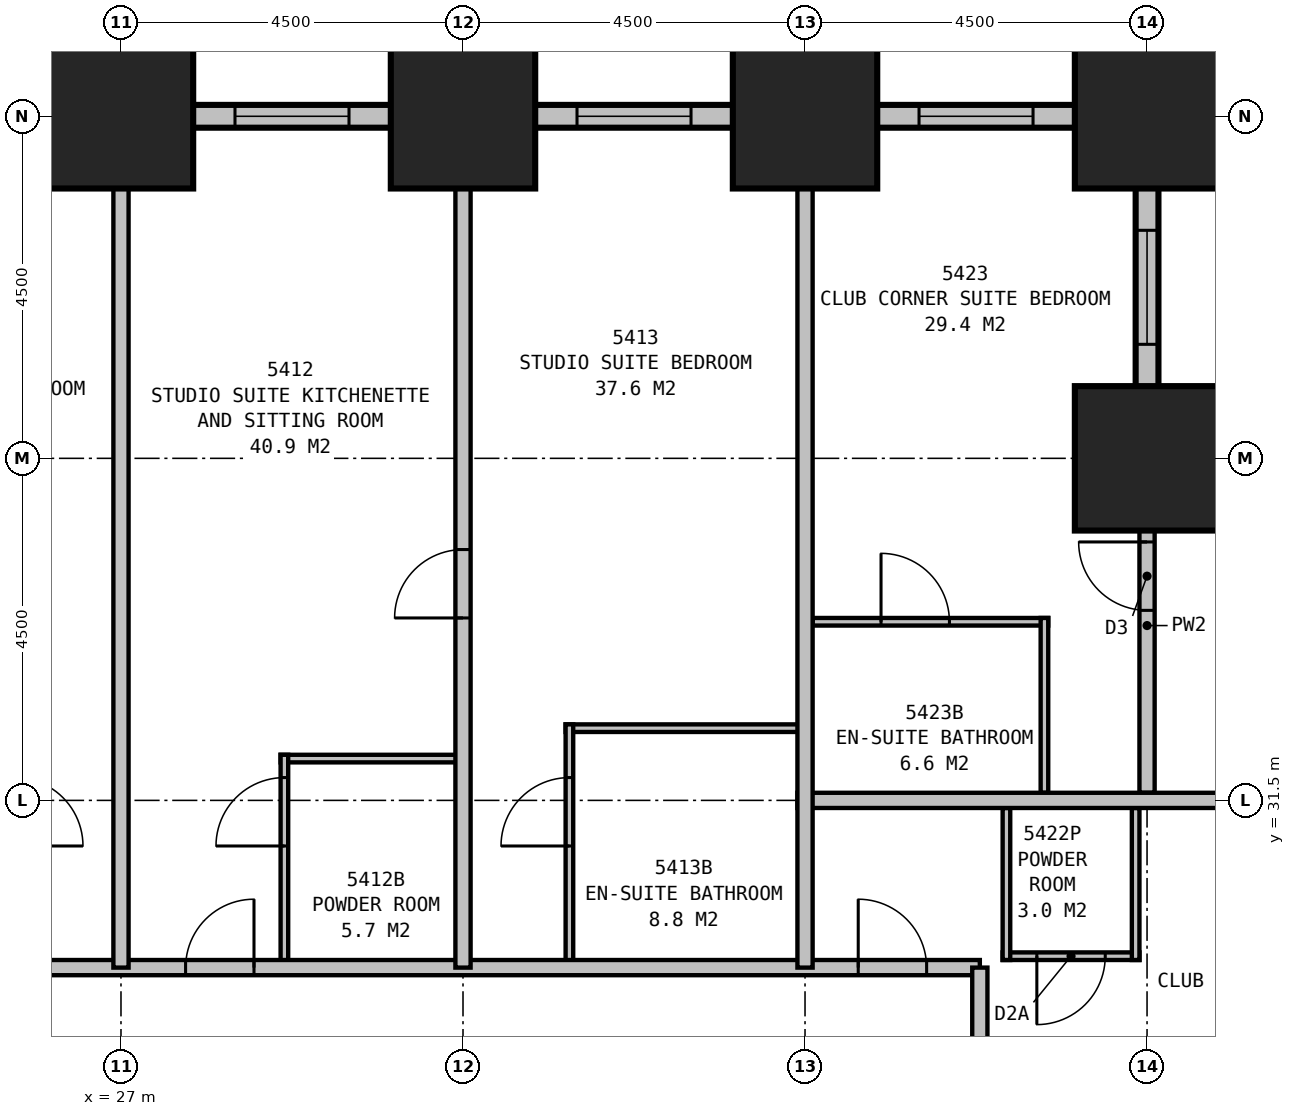
"""IFC4 building model, lengths in metres.
Left out: names, types, materials, properties, quantities, classifications, styles, units other than length and angle.
Written with IfcOpenShell. Run it as: python <this file> out.ifc"""

import sys

from ifc_helpers import new_model, si_unit, direction, frame, frame_2d, origin, origin_2d, place, context, subcontext, project, spatial, rectangle, extrude, element, fill, save


model = new_model("IFC4")
c1 = context("Model", 3, precision=1e-05, world=origin(), true_north=direction((0.0, 1.0)))
c2 = subcontext(c1, "Body", "Model", "MODEL_VIEW")
j1 = project(units=[si_unit("LENGTHUNIT", "METRE"), si_unit("PLANEANGLEUNIT", "RADIAN")], contexts=[c1])
p1 = place(None, origin())
s1 = spatial("IfcSite", under=j1, at=p1, CompositionType="ELEMENT")
p2 = place(p1, origin())
s2 = spatial("IfcBuilding", under=s1, at=p2, CompositionType="ELEMENT")
p3 = place(p2, frame((0.0, 0.0, 207.9)))
s3 = spatial("IfcBuildingStorey", under=s2, at=p3, CompositionType="ELEMENT", Elevation=207.9)
for number, where, z_axis, x_axis in (
    (1, (40.5, 36.0, 0.0), (0.0, 0.0, 1.0), (1.0, 0.0, 0.0)),
    (2, (40.5, 40.5, 0.0), (0.0, 0.0, 1.0), (1.0, 0.0, 0.0)),
    (3, (36.0, 40.5, 0.0), (0.0, 0.0, 1.0), (1.0, 0.0, 0.0)),
    (4, (31.5, 40.5, 0.0), (0.0, 0.0, 1.0), (1.0, 0.0, 0.0)),
    (5, (27.0, 40.5, 0.0), (0.0, 0.0, 1.0), (1.0, 0.0, 0.0)),
):
    element("IfcColumn", number, at=place(p3, frame(where, z_axis=z_axis, x_axis=x_axis)), inside=s3, PredefinedType="COLUMN", context=c2, shape_type="SweptSolid", body=[
        extrude(rectangle(XDim=1.9, YDim=1.9, at=origin_2d()), origin(), (0.0, 0.0, 1.0), 3.5),
    ])
p4 = place(p3, frame((45.65, 36.0, 0.0), z_axis=(0.0, 0.0, 1.0), x_axis=(-1.0, 0.0, 0.0)))
e6 = element("IfcWall", 6, at=p4, inside=s3, PredefinedType="STANDARD", context=c2, shape_type="SweptSolid", body=[
    extrude(rectangle(XDim=5.3, YDim=0.3, at=frame_2d((2.65, 0.0))), origin(), (0.0, 0.0, 1.0), 1.9),
])
p5 = place(p4, frame((1.45, 0.0, 0.5)))
e7 = element("IfcOpeningElement", 7, at=p5, cuts=e6, PredefinedType="OPENING", context=c2, shape_type="SweptSolid", body=[
    extrude(rectangle(XDim=2.4, YDim=1.2, at=frame_2d((1.2, 0.6))), frame((0.0, 0.16, 0.0), z_axis=(0.0, -1.0, 0.0), x_axis=(1.0, 0.0, 0.0)), (0.0, 0.0, 1.0), 0.32),
])
p6 = place(p3, frame((40.5, 35.85, 0.0), z_axis=(0.0, 0.0, 1.0), x_axis=(0.0, 1.0, 0.0)))
e8 = element("IfcWall", 8, at=p6, inside=s3, PredefinedType="STANDARD", context=c2, shape_type="SweptSolid", body=[
    extrude(rectangle(XDim=4.8, YDim=0.3, at=frame_2d((2.4, 0.0))), origin(), (0.0, 0.0, 1.0), 1.9),
])
p7 = place(p6, frame((1.65, 0.0, 0.5)))
e9 = element("IfcOpeningElement", 9, at=p7, cuts=e8, PredefinedType="OPENING", context=c2, shape_type="SweptSolid", body=[
    extrude(rectangle(XDim=1.5, YDim=1.2, at=frame_2d((0.75, 0.6))), frame((0.0, 0.16, 0.0), z_axis=(0.0, -1.0, 0.0), x_axis=(1.0, 0.0, 0.0)), (0.0, 0.0, 1.0), 0.32),
])
p8 = place(p3, frame((40.65, 40.5, 0.0), z_axis=(0.0, 0.0, 1.0), x_axis=(-1.0, 0.0, 0.0)))
e10 = element("IfcWall", 10, at=p8, inside=s3, PredefinedType="STANDARD", context=c2, shape_type="SweptSolid", body=[
    extrude(rectangle(XDim=31.8, YDim=0.3, at=frame_2d((15.9, 0.0))), origin(), (0.0, 0.0, 1.0), 1.9),
])
p9 = place(p8, frame((1.65, 0.0, 0.5)))
e11 = element("IfcOpeningElement", 11, at=p9, cuts=e10, PredefinedType="OPENING", context=c2, shape_type="SweptSolid", body=[
    extrude(rectangle(XDim=1.5, YDim=1.2, at=frame_2d((0.75, 0.6))), frame((0.0, 0.16, 0.0), z_axis=(0.0, -1.0, 0.0), x_axis=(1.0, 0.0, 0.0)), (0.0, 0.0, 1.0), 0.32),
])
p10 = place(p8, frame((6.15, 0.0, 0.5)))
e12 = element("IfcOpeningElement", 12, at=p10, cuts=e10, PredefinedType="OPENING", context=c2, shape_type="SweptSolid", body=[
    extrude(rectangle(XDim=1.5, YDim=1.2, at=frame_2d((0.75, 0.6))), frame((0.0, 0.16, 0.0), z_axis=(0.0, -1.0, 0.0), x_axis=(1.0, 0.0, 0.0)), (0.0, 0.0, 1.0), 0.32),
])
p11 = place(p8, frame((10.65, 0.0, 0.5)))
e13 = element("IfcOpeningElement", 13, at=p11, cuts=e10, PredefinedType="OPENING", context=c2, shape_type="SweptSolid", body=[
    extrude(rectangle(XDim=1.5, YDim=1.2, at=frame_2d((0.75, 0.6))), frame((0.0, 0.16, 0.0), z_axis=(0.0, -1.0, 0.0), x_axis=(1.0, 0.0, 0.0)), (0.0, 0.0, 1.0), 0.32),
])
p12 = place(p8, frame((15.15, 0.0, 0.5)))
e14 = element("IfcOpeningElement", 14, at=p12, cuts=e10, PredefinedType="OPENING", context=c2, shape_type="SweptSolid", body=[
    extrude(rectangle(XDim=1.5, YDim=1.2, at=frame_2d((0.75, 0.6))), frame((0.0, 0.16, 0.0), z_axis=(0.0, -1.0, 0.0), x_axis=(1.0, 0.0, 0.0)), (0.0, 0.0, 1.0), 0.32),
])
p13 = place(p8, frame((19.65, 0.0, 0.5)))
e15 = element("IfcOpeningElement", 15, at=p13, cuts=e10, PredefinedType="OPENING", context=c2, shape_type="SweptSolid", body=[
    extrude(rectangle(XDim=1.5, YDim=1.2, at=frame_2d((0.75, 0.6))), frame((0.0, 0.16, 0.0), z_axis=(0.0, -1.0, 0.0), x_axis=(1.0, 0.0, 0.0)), (0.0, 0.0, 1.0), 0.32),
])
p14 = place(p8, frame((24.15, 0.0, 0.5)))
e16 = element("IfcOpeningElement", 16, at=p14, cuts=e10, PredefinedType="OPENING", context=c2, shape_type="SweptSolid", body=[
    extrude(rectangle(XDim=1.5, YDim=1.2, at=frame_2d((0.75, 0.6))), frame((0.0, 0.16, 0.0), z_axis=(0.0, -1.0, 0.0), x_axis=(1.0, 0.0, 0.0)), (0.0, 0.0, 1.0), 0.32),
])
p15 = place(p8, frame((28.65, 0.0, 0.5)))
e17 = element("IfcOpeningElement", 17, at=p15, cuts=e10, PredefinedType="OPENING", context=c2, shape_type="SweptSolid", body=[
    extrude(rectangle(XDim=1.5, YDim=1.2, at=frame_2d((0.75, 0.6))), frame((0.0, 0.16, 0.0), z_axis=(0.0, -1.0, 0.0), x_axis=(1.0, 0.0, 0.0)), (0.0, 0.0, 1.0), 0.32),
])
p16 = place(p3, frame((11.2, 29.3, 0.0), z_axis=(0.0, 0.0, 1.0), x_axis=(1.0, 0.0, 0.0)))
e18 = element("IfcWall", 18, at=p16, inside=s3, PredefinedType="PARTITIONING", context=c2, shape_type="SweptSolid", body=[
    extrude(rectangle(XDim=27.1, YDim=0.2, at=frame_2d((13.55, 0.0))), origin(), (0.0, 0.0, 1.0), 3.25),
])
p17 = place(p16, frame((3.15, 0.0, 0.0)))
e19 = element("IfcOpeningElement", 19, at=p17, cuts=e18, PredefinedType="OPENING", context=c2, shape_type="SweptSolid", body=[
    extrude(rectangle(XDim=0.9, YDim=2.1, at=frame_2d((0.45, 1.05))), frame((0.0, 0.11, 0.0), z_axis=(0.0, -1.0, 0.0), x_axis=(1.0, 0.0, 0.0)), (0.0, 0.0, 1.0), 0.22),
])
p18 = place(p16, frame((16.65, 0.0, 0.0)))
e20 = element("IfcOpeningElement", 20, at=p18, cuts=e18, PredefinedType="OPENING", context=c2, shape_type="SweptSolid", body=[
    extrude(rectangle(XDim=0.9, YDim=2.1, at=frame_2d((0.45, 1.05))), frame((0.0, 0.11, 0.0), z_axis=(0.0, -1.0, 0.0), x_axis=(1.0, 0.0, 0.0)), (0.0, 0.0, 1.0), 0.22),
])
p19 = place(p16, frame((25.5, 0.0, 0.0)))
e21 = element("IfcOpeningElement", 21, at=p19, cuts=e18, PredefinedType="OPENING", context=c2, shape_type="SweptSolid", body=[
    extrude(rectangle(XDim=0.9, YDim=2.1, at=frame_2d((0.45, 1.05))), frame((0.0, 0.11, 0.0), z_axis=(0.0, -1.0, 0.0), x_axis=(1.0, 0.0, 0.0)), (0.0, 0.0, 1.0), 0.22),
])
p20 = place(p16, frame((0.7, 0.0, 0.0)))
e22 = element("IfcOpeningElement", 22, at=p20, cuts=e18, PredefinedType="OPENING", context=c2, shape_type="SweptSolid", body=[
    extrude(rectangle(XDim=0.9, YDim=2.1, at=frame_2d((0.45, 1.05))), frame((0.0, 0.11, 0.0), z_axis=(0.0, -1.0, 0.0), x_axis=(1.0, 0.0, 0.0)), (0.0, 0.0, 1.0), 0.22),
])
p21 = place(p3, frame((38.3, 10.6, 0.0), z_axis=(0.0, 0.0, 1.0), x_axis=(0.0, 1.0, 0.0)))
e23 = element("IfcWall", 23, at=p21, inside=s3, PredefinedType="PARTITIONING", context=c2, shape_type="SweptSolid", body=[
    extrude(rectangle(XDim=18.7, YDim=0.2, at=frame_2d((9.35, 0.0))), origin(), (0.0, 0.0, 1.0), 3.25),
])
p22 = place(p21, frame((6.95, 0.0, 0.0), z_axis=(0.0, 0.0, 1.0), x_axis=(-1.0, 0.0, 0.0)))
e24 = element("IfcOpeningElement", 24, at=p22, cuts=e23, PredefinedType="OPENING", context=c2, shape_type="SweptSolid", body=[
    extrude(rectangle(XDim=0.9, YDim=2.1, at=frame_2d((0.45, 1.05))), frame((0.0, 0.11, 0.0), z_axis=(0.0, -1.0, 0.0), x_axis=(1.0, 0.0, 0.0)), (0.0, 0.0, 1.0), 0.22),
])
p23 = place(p21, frame((10.9, 0.0, 0.0), z_axis=(0.0, 0.0, 1.0), x_axis=(-1.0, 0.0, 0.0)))
e25 = element("IfcOpeningElement", 25, at=p23, cuts=e23, PredefinedType="OPENING", context=c2, shape_type="SweptSolid", body=[
    extrude(rectangle(XDim=0.9, YDim=2.1, at=frame_2d((0.45, 1.05))), frame((0.0, 0.11, 0.0), z_axis=(0.0, -1.0, 0.0), x_axis=(1.0, 0.0, 0.0)), (0.0, 0.0, 1.0), 0.22),
])
p24 = place(p3, frame((27.0, 29.3, 0.0), z_axis=(0.0, 0.0, 1.0), x_axis=(0.0, 1.0, 0.0)))
e26 = element("IfcWall", 26, at=p24, inside=s3, PredefinedType="PARTITIONING", context=c2, shape_type="SweptSolid", body=[
    extrude(rectangle(XDim=11.2, YDim=0.2, at=frame_2d((5.6, 0.0))), origin(), (0.0, 0.0, 1.0), 2.2),
])
p25 = place(p3, frame((31.5, 29.3, 0.0), z_axis=(0.0, 0.0, 1.0), x_axis=(0.0, 1.0, 0.0)))
e27 = element("IfcWall", 27, at=p25, inside=s3, PredefinedType="PARTITIONING", context=c2, shape_type="SweptSolid", body=[
    extrude(rectangle(XDim=11.2, YDim=0.2, at=frame_2d((5.6, 0.0))), origin(), (0.0, 0.0, 1.0), 2.2),
])
p26 = place(p25, frame((4.6, 0.0, 0.0)))
e28 = element("IfcOpeningElement", 28, at=p26, cuts=e27, PredefinedType="OPENING", context=c2, shape_type="SweptSolid", body=[
    extrude(rectangle(XDim=0.9, YDim=2.1, at=frame_2d((0.45, 1.05))), frame((0.0, 0.11, 0.0), z_axis=(0.0, -1.0, 0.0), x_axis=(1.0, 0.0, 0.0)), (0.0, 0.0, 1.0), 0.22),
])
p27 = place(p3, frame((29.1, 32.05, 0.0), z_axis=(0.0, 0.0, 1.0), x_axis=(1.0, 0.0, 0.0)))
e29 = element("IfcWall", 29, at=p27, inside=s3, PredefinedType="PLUMBINGWALL", context=c2, shape_type="SweptSolid", body=[
    extrude(rectangle(XDim=2.4, YDim=0.1, at=frame_2d((1.2, 0.0))), origin(), (0.0, 0.0, 1.0), 3.25),
])
p28 = place(p3, frame((29.15, 29.3, 0.0), z_axis=(0.0, 0.0, 1.0), x_axis=(0.0, 1.0, 0.0)))
e30 = element("IfcWall", 30, at=p28, inside=s3, PredefinedType="PLUMBINGWALL", context=c2, shape_type="SweptSolid", body=[
    extrude(rectangle(XDim=2.8, YDim=0.1, at=frame_2d((1.4, 0.0))), origin(), (0.0, 0.0, 1.0), 3.25),
])
p29 = place(p28, frame((1.6, 0.0, 0.0)))
e31 = element("IfcOpeningElement", 31, at=p29, cuts=e30, PredefinedType="OPENING", context=c2, shape_type="SweptSolid", body=[
    extrude(rectangle(XDim=0.9, YDim=2.1, at=frame_2d((0.45, 1.05))), frame((0.0, 0.06, 0.0), z_axis=(0.0, -1.0, 0.0), x_axis=(1.0, 0.0, 0.0)), (0.0, 0.0, 1.0), 0.12),
])
p30 = place(p3, frame((32.85, 32.45, 0.0), z_axis=(0.0, 0.0, 1.0), x_axis=(1.0, 0.0, 0.0)))
e32 = element("IfcWall", 32, at=p30, inside=s3, PredefinedType="PLUMBINGWALL", context=c2, shape_type="SweptSolid", body=[
    extrude(rectangle(XDim=3.15, YDim=0.1, at=frame_2d((1.575, 0.0))), origin(), (0.0, 0.0, 1.0), 3.25),
])
p31 = place(p3, frame((32.9, 29.3, 0.0), z_axis=(0.0, 0.0, 1.0), x_axis=(0.0, 1.0, 0.0)))
e33 = element("IfcWall", 33, at=p31, inside=s3, PredefinedType="PLUMBINGWALL", context=c2, shape_type="SweptSolid", body=[
    extrude(rectangle(XDim=3.2, YDim=0.1, at=frame_2d((1.6, 0.0))), origin(), (0.0, 0.0, 1.0), 3.25),
])
p32 = place(p31, frame((1.6, 0.0, 0.0)))
e34 = element("IfcOpeningElement", 34, at=p32, cuts=e33, PredefinedType="OPENING", context=c2, shape_type="SweptSolid", body=[
    extrude(rectangle(XDim=0.9, YDim=2.1, at=frame_2d((0.45, 1.05))), frame((0.0, 0.06, 0.0), z_axis=(0.0, -1.0, 0.0), x_axis=(1.0, 0.0, 0.0)), (0.0, 0.0, 1.0), 0.12),
])
p33 = place(p3, frame((36.0, 29.3, 0.0), z_axis=(0.0, 0.0, 1.0), x_axis=(0.0, 1.0, 0.0)))
e35 = element("IfcWall", 35, at=p33, inside=s3, PredefinedType="PARTITIONING", context=c2, shape_type="SweptSolid", body=[
    extrude(rectangle(XDim=11.2, YDim=0.2, at=frame_2d((5.6, 0.0))), origin(), (0.0, 0.0, 1.0), 2.2),
])
p34 = place(p3, frame((35.9, 31.5, 0.0), z_axis=(0.0, 0.0, 1.0), x_axis=(1.0, 0.0, 0.0)))
e36 = element("IfcWall", 36, at=p34, inside=s3, PredefinedType="PARTITIONING", context=c2, shape_type="SweptSolid", body=[
    extrude(rectangle(XDim=10.099, YDim=0.2, at=frame_2d((5.05, 0.0))), origin(), (0.0, 0.0, 1.0), 3.25),
])
p35 = place(p34, frame((8.099, 0.0, 0.0)))
e37 = element("IfcOpeningElement", 37, at=p35, cuts=e36, PredefinedType="OPENING", context=c2, shape_type="SweptSolid", body=[
    extrude(rectangle(XDim=0.9, YDim=2.1, at=frame_2d((0.45, 1.05))), frame((0.0, 0.11, 0.0), z_axis=(0.0, -1.0, 0.0), x_axis=(1.0, 0.0, 0.0)), (0.0, 0.0, 1.0), 0.22),
])
p36 = place(p3, frame((40.35, 31.4, 0.0), z_axis=(0.0, 0.0, 1.0), x_axis=(0.0, -1.0, 0.0)))
e38 = element("IfcWall", 38, at=p36, inside=s3, PredefinedType="PLUMBINGWALL", context=c2, shape_type="SweptSolid", body=[
    extrude(rectangle(XDim=2.0, YDim=0.1, at=frame_2d((1.0, 0.0))), origin(), (0.0, 0.0, 1.0), 2.2),
])
p37 = place(p3, frame((38.65, 31.4, 0.0), z_axis=(0.0, 0.0, 1.0), x_axis=(0.0, -1.0, 0.0)))
e39 = element("IfcWall", 39, at=p37, inside=s3, PredefinedType="PLUMBINGWALL", context=c2, shape_type="SweptSolid", body=[
    extrude(rectangle(XDim=2.0, YDim=0.1, at=frame_2d((1.0, 0.0))), origin(), (0.0, 0.0, 1.0), 3.25),
])
p38 = place(p3, frame((38.6, 29.45, 0.0), z_axis=(0.0, 0.0, 1.0), x_axis=(1.0, 0.0, 0.0)))
e40 = element("IfcWall", 40, at=p38, inside=s3, PredefinedType="PLUMBINGWALL", context=c2, shape_type="SweptSolid", body=[
    extrude(rectangle(XDim=1.8, YDim=0.1, at=frame_2d((0.9, 0.0))), origin(), (0.0, 0.0, 1.0), 3.25),
])
p39 = place(p38, frame((1.35, 0.0, 0.0), z_axis=(0.0, 0.0, 1.0), x_axis=(-1.0, 0.0, 0.0)))
e41 = element("IfcOpeningElement", 41, at=p39, cuts=e40, PredefinedType="OPENING", context=c2, shape_type="SweptSolid", body=[
    extrude(rectangle(XDim=0.9, YDim=2.1, at=frame_2d((0.45, 1.05))), frame((0.0, 0.06, 0.0), z_axis=(0.0, -1.0, 0.0), x_axis=(1.0, 0.0, 0.0)), (0.0, 0.0, 1.0), 0.12),
])
p40 = place(p3, frame((40.5, 31.6, 0.0), z_axis=(0.0, 0.0, 1.0), x_axis=(0.0, 1.0, 0.0)))
e42 = element("IfcWall", 42, at=p40, inside=s3, PredefinedType="PARTITIONING", context=c2, shape_type="SweptSolid", body=[
    extrude(rectangle(XDim=4.4, YDim=0.2, at=frame_2d((2.2, 0.0))), origin(), (0.0, 0.0, 1.0), 2.2),
])
p41 = place(p40, frame((2.4, 0.0, 0.0)))
e43 = element("IfcOpeningElement", 43, at=p41, cuts=e42, PredefinedType="OPENING", context=c2, shape_type="SweptSolid", body=[
    extrude(rectangle(XDim=0.9, YDim=2.1, at=frame_2d((0.45, 1.05))), frame((0.0, 0.11, 0.0), z_axis=(0.0, -1.0, 0.0), x_axis=(1.0, 0.0, 0.0)), (0.0, 0.0, 1.0), 0.22),
])
p42 = place(p3, frame((39.15, 31.6, 0.0), z_axis=(0.0, 0.0, 1.0), x_axis=(0.0, 1.0, 0.0)))
e44 = element("IfcWall", 44, at=p42, inside=s3, PredefinedType="PLUMBINGWALL", context=c2, shape_type="SweptSolid", body=[
    extrude(rectangle(XDim=2.3, YDim=0.1, at=frame_2d((1.15, 0.0))), origin(), (0.0, 0.0, 1.0), 3.25),
])
p43 = place(p3, frame((36.1, 33.85, 0.0), z_axis=(0.0, 0.0, 1.0), x_axis=(1.0, 0.0, 0.0)))
e45 = element("IfcWall", 45, at=p43, inside=s3, PredefinedType="PLUMBINGWALL", context=c2, shape_type="SweptSolid", body=[
    extrude(rectangle(XDim=3.1, YDim=0.1, at=frame_2d((1.55, 0.0))), origin(), (0.0, 0.0, 1.0), 3.25),
])
p44 = place(p43, frame((0.9, 0.0, 0.0)))
e46 = element("IfcOpeningElement", 46, at=p44, cuts=e45, PredefinedType="OPENING", context=c2, shape_type="SweptSolid", body=[
    extrude(rectangle(XDim=0.9, YDim=2.1, at=frame_2d((0.45, 1.05))), frame((0.0, 0.06, 0.0), z_axis=(0.0, -1.0, 0.0), x_axis=(1.0, 0.0, 0.0)), (0.0, 0.0, 1.0), 0.12),
])
p45 = place(p7, origin())
e47 = element("IfcWindow", 47, at=p45, inside=s3, PartitioningType="SINGLE_PANEL", PredefinedType="WINDOW", context=c2, shape_type="SweptSolid", body=[
    extrude(rectangle(XDim=1.5, YDim=1.2, at=frame_2d((0.75, 0.6))), frame((0.0, 0.03, 0.0), z_axis=(0.0, -1.0, 0.0), x_axis=(1.0, 0.0, 0.0)), (0.0, 0.0, 1.0), 0.06),
])
fill(e9, e47)
p46 = place(p9, origin())
e48 = element("IfcWindow", 48, at=p46, inside=s3, PartitioningType="SINGLE_PANEL", PredefinedType="WINDOW", context=c2, shape_type="SweptSolid", body=[
    extrude(rectangle(XDim=1.5, YDim=1.2, at=frame_2d((0.75, 0.6))), frame((0.0, 0.03, 0.0), z_axis=(0.0, -1.0, 0.0), x_axis=(1.0, 0.0, 0.0)), (0.0, 0.0, 1.0), 0.06),
])
fill(e11, e48)
p47 = place(p10, origin())
e49 = element("IfcWindow", 49, at=p47, inside=s3, PartitioningType="SINGLE_PANEL", PredefinedType="WINDOW", context=c2, shape_type="SweptSolid", body=[
    extrude(rectangle(XDim=1.5, YDim=1.2, at=frame_2d((0.75, 0.6))), frame((0.0, 0.03, 0.0), z_axis=(0.0, -1.0, 0.0), x_axis=(1.0, 0.0, 0.0)), (0.0, 0.0, 1.0), 0.06),
])
fill(e12, e49)
p48 = place(p11, origin())
e50 = element("IfcWindow", 50, at=p48, inside=s3, PartitioningType="SINGLE_PANEL", PredefinedType="WINDOW", context=c2, shape_type="SweptSolid", body=[
    extrude(rectangle(XDim=1.5, YDim=1.2, at=frame_2d((0.75, 0.6))), frame((0.0, 0.03, 0.0), z_axis=(0.0, -1.0, 0.0), x_axis=(1.0, 0.0, 0.0)), (0.0, 0.0, 1.0), 0.06),
])
fill(e13, e50)
p49 = place(p18, origin())
e51 = element("IfcDoor", 51, at=p49, inside=s3, OperationType="SINGLE_SWING_RIGHT", PredefinedType="DOOR", context=c2, shape_type="SweptSolid", body=[
    extrude(rectangle(XDim=0.9, YDim=2.1, at=frame_2d((0.45, 1.05))), frame((0.0, 0.025, 0.0), z_axis=(0.0, -1.0, 0.0), x_axis=(1.0, 0.0, 0.0)), (0.0, 0.0, 1.0), 0.05),
])
fill(e20, e51)
p50 = place(p19, origin())
e52 = element("IfcDoor", 52, at=p50, inside=s3, OperationType="SINGLE_SWING_LEFT", PredefinedType="DOOR", context=c2, shape_type="SweptSolid", body=[
    extrude(rectangle(XDim=0.9, YDim=2.1, at=frame_2d((0.45, 1.05))), frame((0.0, 0.025, 0.0), z_axis=(0.0, -1.0, 0.0), x_axis=(1.0, 0.0, 0.0)), (0.0, 0.0, 1.0), 0.05),
])
fill(e21, e52)
p51 = place(p26, origin())
e53 = element("IfcDoor", 53, at=p51, inside=s3, OperationType="SINGLE_SWING_LEFT", PredefinedType="DOOR", context=c2, shape_type="SweptSolid", body=[
    extrude(rectangle(XDim=0.9, YDim=2.1, at=frame_2d((0.45, 1.05))), frame((0.0, 0.025, 0.0), z_axis=(0.0, -1.0, 0.0), x_axis=(1.0, 0.0, 0.0)), (0.0, 0.0, 1.0), 0.05),
])
fill(e28, e53)
p52 = place(p29, origin())
e54 = element("IfcDoor", 54, at=p52, inside=s3, OperationType="SINGLE_SWING_LEFT", PredefinedType="DOOR", context=c2, shape_type="SweptSolid", body=[
    extrude(rectangle(XDim=0.9, YDim=2.1, at=frame_2d((0.45, 1.05))), frame((0.0, 0.025, 0.0), z_axis=(0.0, -1.0, 0.0), x_axis=(1.0, 0.0, 0.0)), (0.0, 0.0, 1.0), 0.05),
])
fill(e31, e54)
p53 = place(p32, origin())
e55 = element("IfcDoor", 55, at=p53, inside=s3, OperationType="SINGLE_SWING_LEFT", PredefinedType="DOOR", context=c2, shape_type="SweptSolid", body=[
    extrude(rectangle(XDim=0.9, YDim=2.1, at=frame_2d((0.45, 1.05))), frame((0.0, 0.025, 0.0), z_axis=(0.0, -1.0, 0.0), x_axis=(1.0, 0.0, 0.0)), (0.0, 0.0, 1.0), 0.05),
])
fill(e34, e55)
p54 = place(p39, origin())
e56 = element("IfcDoor", 56, at=p54, inside=s3, OperationType="SINGLE_SWING_RIGHT", PredefinedType="DOOR", context=c2, shape_type="SweptSolid", body=[
    extrude(rectangle(XDim=0.9, YDim=2.1, at=frame_2d((0.45, 1.05))), frame((0.0, 0.025, 0.0), z_axis=(0.0, -1.0, 0.0), x_axis=(1.0, 0.0, 0.0)), (0.0, 0.0, 1.0), 0.05),
])
fill(e41, e56)
p55 = place(p41, origin())
e57 = element("IfcDoor", 57, at=p55, inside=s3, OperationType="SINGLE_SWING_RIGHT", PredefinedType="DOOR", context=c2, shape_type="SweptSolid", body=[
    extrude(rectangle(XDim=0.9, YDim=2.1, at=frame_2d((0.45, 1.05))), frame((0.0, 0.025, 0.0), z_axis=(0.0, -1.0, 0.0), x_axis=(1.0, 0.0, 0.0)), (0.0, 0.0, 1.0), 0.05),
])
fill(e43, e57)
p56 = place(p44, origin())
e58 = element("IfcDoor", 58, at=p56, inside=s3, OperationType="SINGLE_SWING_LEFT", PredefinedType="DOOR", context=c2, shape_type="SweptSolid", body=[
    extrude(rectangle(XDim=0.9, YDim=2.1, at=frame_2d((0.45, 1.05))), frame((0.0, 0.025, 0.0), z_axis=(0.0, -1.0, 0.0), x_axis=(1.0, 0.0, 0.0)), (0.0, 0.0, 1.0), 0.05),
])
fill(e46, e58)
save(model, sys.argv[1])
